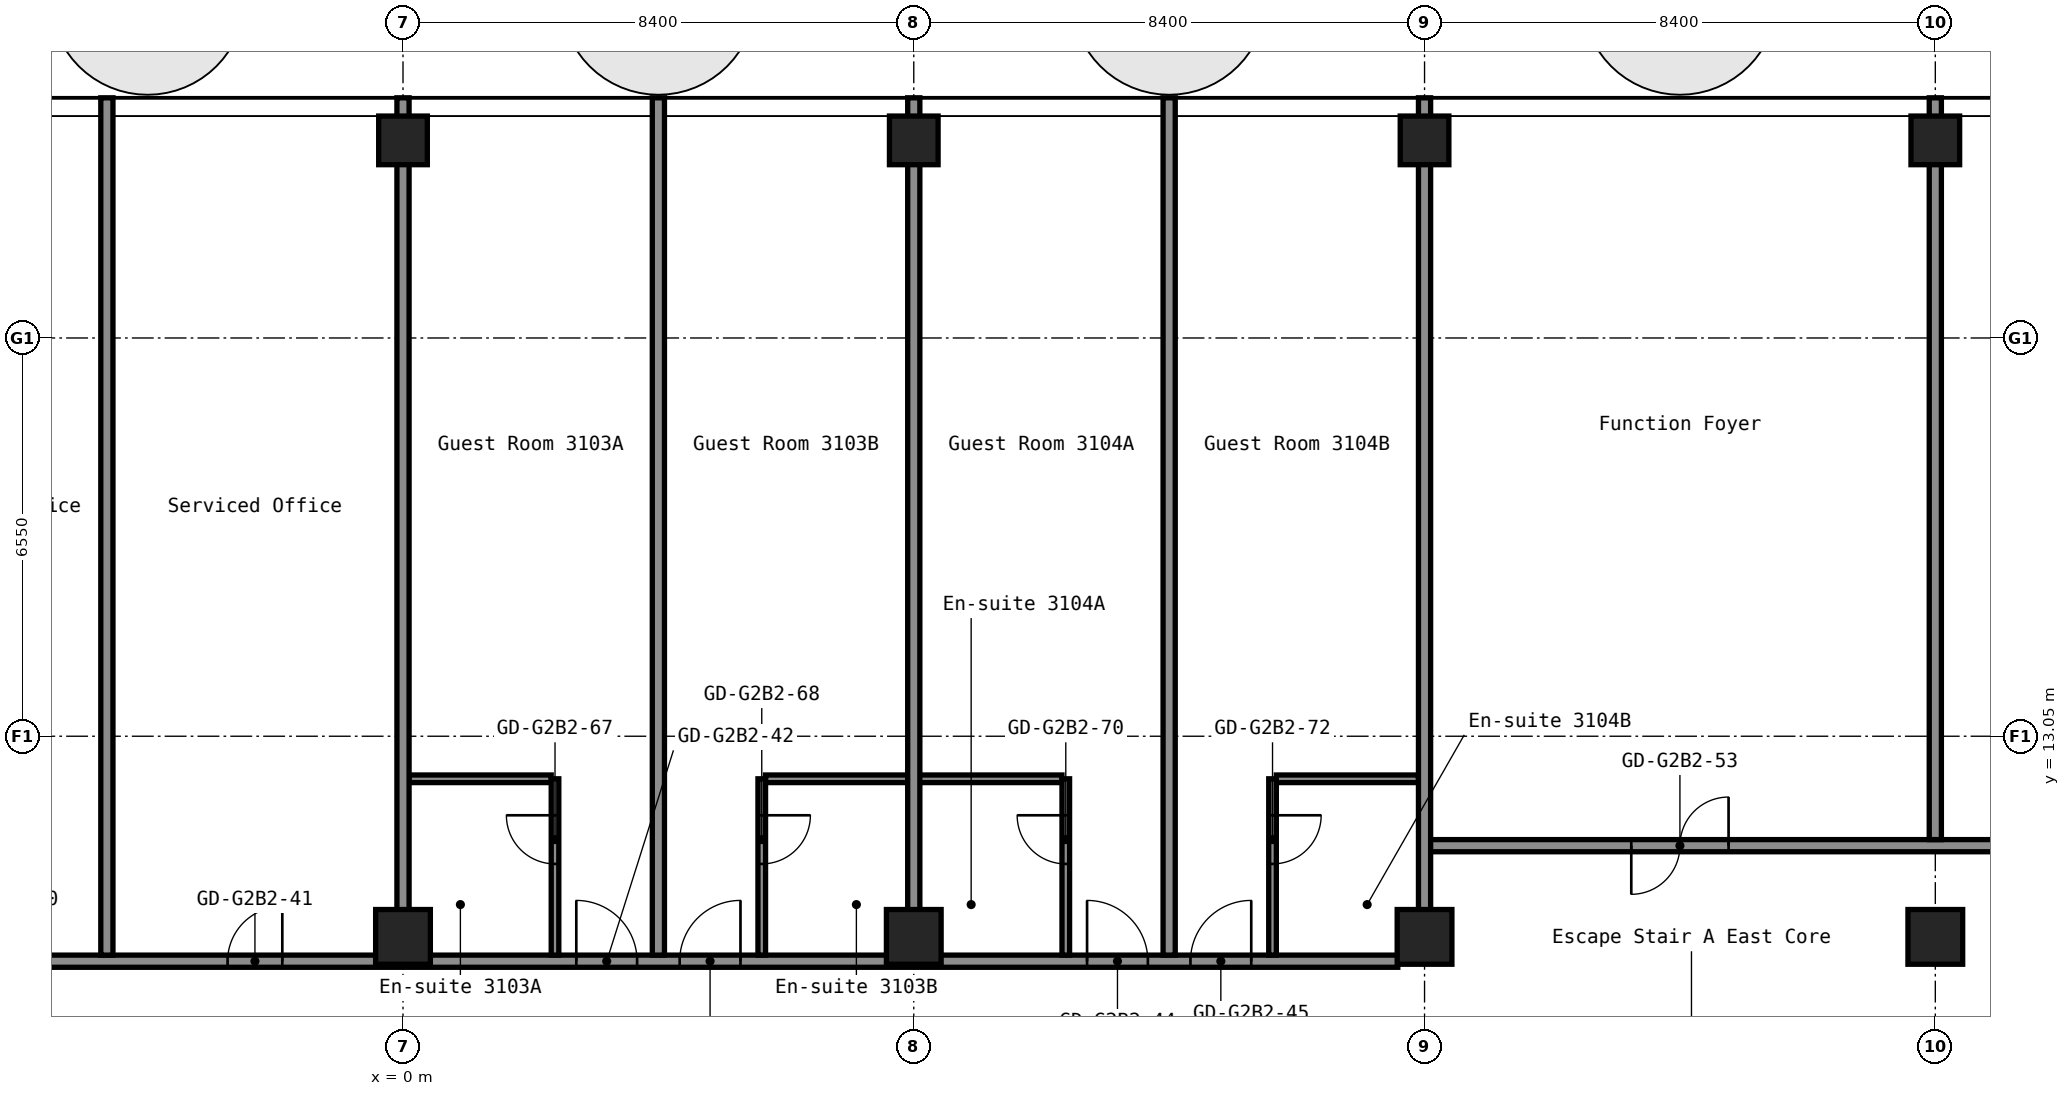
"""IFC4 building model, lengths in metres.
Left out: names, types, materials, properties, quantities, classifications, styles, units other than length and angle.
Written with IfcOpenShell. Run it as: python <this file> out.ifc"""

import sys

from ifc_helpers import new_model, si_unit, direction, frame, frame_2d, origin, origin_2d, place, context, subcontext, project, spatial, rectangle, hollow_rectangle, extrude, element, fill, save


model = new_model("IFC4")
c1 = context("Model", 3, precision=1e-05, world=origin(), true_north=direction((0.0, 1.0)))
c2 = subcontext(c1, "Body", "Model", "MODEL_VIEW")
j1 = project(units=[si_unit("LENGTHUNIT", "METRE"), si_unit("PLANEANGLEUNIT", "RADIAN")], contexts=[c1])
p1 = place(None, origin())
s1 = spatial("IfcSite", under=j1, at=p1, CompositionType="ELEMENT")
p2 = place(p1, origin())
s2 = spatial("IfcBuilding", under=s1, at=p2, CompositionType="ELEMENT")
p3 = place(p2, frame((0.0, 0.0, 110.6)))
s3 = spatial("IfcBuildingStorey", under=s2, at=p3, CompositionType="ELEMENT", Elevation=110.6)
p4 = place(p3, frame((0.0, 9.75, 0.0), z_axis=(0.0, 0.0, 1.0), x_axis=(1.0, 0.0, 0.0)))
e1 = element("IfcColumn", 1, at=p4, inside=s3, PredefinedType="COLUMN", context=c2, shape_type="SweptSolid", body=[
    extrude(hollow_rectangle(XDim=0.9, YDim=0.9, WallThickness=0.036, at=origin_2d()), origin(), (0.0, 0.0, 1.0), 2.8),
])
p5 = place(p3, frame((0.0, 22.85, 0.0), z_axis=(0.0, 0.0, 1.0), x_axis=(1.0, 0.0, 0.0)))
e2 = element("IfcColumn", 2, at=p5, inside=s3, PredefinedType="COLUMN", context=c2, shape_type="SweptSolid", body=[
    extrude(hollow_rectangle(XDim=0.8, YDim=0.8, WallThickness=0.032, at=origin_2d()), origin(), (0.0, 0.0, 1.0), 2.8),
])
p6 = place(p3, frame((8.4, 9.75, 0.0), z_axis=(0.0, 0.0, 1.0), x_axis=(1.0, 0.0, 0.0)))
e3 = element("IfcColumn", 3, at=p6, inside=s3, PredefinedType="COLUMN", context=c2, shape_type="SweptSolid", body=[
    extrude(hollow_rectangle(XDim=0.9, YDim=0.9, WallThickness=0.036, at=origin_2d()), origin(), (0.0, 0.0, 1.0), 2.8),
])
p7 = place(p3, frame((8.4, 22.85, 0.0), z_axis=(0.0, 0.0, 1.0), x_axis=(1.0, 0.0, 0.0)))
e4 = element("IfcColumn", 4, at=p7, inside=s3, PredefinedType="COLUMN", context=c2, shape_type="SweptSolid", body=[
    extrude(hollow_rectangle(XDim=0.8, YDim=0.8, WallThickness=0.032, at=origin_2d()), origin(), (0.0, 0.0, 1.0), 2.8),
])
p8 = place(p3, frame((16.8, 9.75, 0.0), z_axis=(0.0, 0.0, 1.0), x_axis=(1.0, 0.0, 0.0)))
e5 = element("IfcColumn", 5, at=p8, inside=s3, PredefinedType="COLUMN", context=c2, shape_type="SweptSolid", body=[
    extrude(hollow_rectangle(XDim=0.9, YDim=0.9, WallThickness=0.036, at=origin_2d()), origin(), (0.0, 0.0, 1.0), 2.8),
])
p9 = place(p3, frame((16.8, 22.85, 0.0), z_axis=(0.0, 0.0, 1.0), x_axis=(1.0, 0.0, 0.0)))
e6 = element("IfcColumn", 6, at=p9, inside=s3, PredefinedType="COLUMN", context=c2, shape_type="SweptSolid", body=[
    extrude(hollow_rectangle(XDim=0.8, YDim=0.8, WallThickness=0.032, at=origin_2d()), origin(), (0.0, 0.0, 1.0), 2.8),
])
p10 = place(p3, frame((25.2, 9.75, 0.0), z_axis=(0.0, 0.0, 1.0), x_axis=(1.0, 0.0, 0.0)))
e7 = element("IfcColumn", 7, at=p10, inside=s3, PredefinedType="COLUMN", context=c2, shape_type="SweptSolid", body=[
    extrude(hollow_rectangle(XDim=0.9, YDim=0.9, WallThickness=0.036, at=origin_2d()), origin(), (0.0, 0.0, 1.0), 2.8),
])
p11 = place(p3, frame((25.2, 22.85, 0.0), z_axis=(0.0, 0.0, 1.0), x_axis=(1.0, 0.0, 0.0)))
e8 = element("IfcColumn", 8, at=p11, inside=s3, PredefinedType="COLUMN", context=c2, shape_type="SweptSolid", body=[
    extrude(hollow_rectangle(XDim=0.8, YDim=0.8, WallThickness=0.032, at=origin_2d()), origin(), (0.0, 0.0, 1.0), 2.8),
])
p12 = place(p3, frame((-16.36, 9.35, 0.0), z_axis=(0.0, 0.0, 1.0), x_axis=(1.0, 0.0, 0.0)))
e9 = element("IfcWall", 9, at=p12, inside=s3, PredefinedType="PARTITIONING", context=c2, shape_type="SweptSolid", body=[
    extrude(rectangle(XDim=32.72, YDim=0.2, at=frame_2d((16.36, 0.0))), origin(), (0.0, 0.0, 1.0), 2.8),
])
p13 = place(p12, frame((1.545, 0.0, 0.0)))
e10 = element("IfcOpeningElement", 10, at=p13, cuts=e9, PredefinedType="OPENING", context=c2, shape_type="SweptSolid", body=[
    extrude(rectangle(XDim=0.9, YDim=2.1, at=frame_2d((0.45, 1.05))), frame((0.0, 0.11, 0.0), z_axis=(0.0, -1.0, 0.0), x_axis=(1.0, 0.0, 0.0)), (0.0, 0.0, 1.0), 0.22),
])
p14 = place(p12, frame((5.745, 0.0, 0.0)))
e11 = element("IfcOpeningElement", 11, at=p14, cuts=e9, PredefinedType="OPENING", context=c2, shape_type="SweptSolid", body=[
    extrude(rectangle(XDim=0.9, YDim=2.1, at=frame_2d((0.45, 1.05))), frame((0.0, 0.11, 0.0), z_axis=(0.0, -1.0, 0.0), x_axis=(1.0, 0.0, 0.0)), (0.0, 0.0, 1.0), 0.22),
])
p15 = place(p12, frame((9.275, 0.0, 0.0)))
e12 = element("IfcOpeningElement", 12, at=p15, cuts=e9, PredefinedType="OPENING", context=c2, shape_type="SweptSolid", body=[
    extrude(rectangle(XDim=0.9, YDim=2.1, at=frame_2d((0.45, 1.05))), frame((0.0, 0.11, 0.0), z_axis=(0.0, -1.0, 0.0), x_axis=(1.0, 0.0, 0.0)), (0.0, 0.0, 1.0), 0.22),
])
p16 = place(p12, frame((13.475, 0.0, 0.0)))
e13 = element("IfcOpeningElement", 13, at=p16, cuts=e9, PredefinedType="OPENING", context=c2, shape_type="SweptSolid", body=[
    extrude(rectangle(XDim=0.9, YDim=2.1, at=frame_2d((0.45, 1.05))), frame((0.0, 0.11, 0.0), z_axis=(0.0, -1.0, 0.0), x_axis=(1.0, 0.0, 0.0)), (0.0, 0.0, 1.0), 0.22),
])
p17 = place(p12, frame((19.21, 0.0, 0.0)))
e14 = element("IfcOpeningElement", 14, at=p17, cuts=e9, PredefinedType="OPENING", context=c2, shape_type="SweptSolid", body=[
    extrude(rectangle(XDim=1.0, YDim=2.1, at=frame_2d((0.5, 1.05))), frame((0.0, 0.11, 0.0), z_axis=(0.0, -1.0, 0.0), x_axis=(1.0, 0.0, 0.0)), (0.0, 0.0, 1.0), 0.22),
])
p18 = place(p12, frame((20.91, 0.0, 0.0)))
e15 = element("IfcOpeningElement", 15, at=p18, cuts=e9, PredefinedType="OPENING", context=c2, shape_type="SweptSolid", body=[
    extrude(rectangle(XDim=1.0, YDim=2.1, at=frame_2d((0.5, 1.05))), frame((0.0, 0.11, 0.0), z_axis=(0.0, -1.0, 0.0), x_axis=(1.0, 0.0, 0.0)), (0.0, 0.0, 1.0), 0.22),
])
p19 = place(p12, frame((27.61, 0.0, 0.0)))
e16 = element("IfcOpeningElement", 16, at=p19, cuts=e9, PredefinedType="OPENING", context=c2, shape_type="SweptSolid", body=[
    extrude(rectangle(XDim=1.0, YDim=2.1, at=frame_2d((0.5, 1.05))), frame((0.0, 0.11, 0.0), z_axis=(0.0, -1.0, 0.0), x_axis=(1.0, 0.0, 0.0)), (0.0, 0.0, 1.0), 0.22),
])
p20 = place(p12, frame((29.31, 0.0, 0.0)))
e17 = element("IfcOpeningElement", 17, at=p20, cuts=e9, PredefinedType="OPENING", context=c2, shape_type="SweptSolid", body=[
    extrude(rectangle(XDim=1.0, YDim=2.1, at=frame_2d((0.5, 1.05))), frame((0.0, 0.11, 0.0), z_axis=(0.0, -1.0, 0.0), x_axis=(1.0, 0.0, 0.0)), (0.0, 0.0, 1.0), 0.22),
])
p21 = place(p3, frame((16.8, 11.25, 0.0), z_axis=(0.0, 0.0, 1.0), x_axis=(1.0, 0.0, 0.0)))
e18 = element("IfcWall", 18, at=p21, inside=s3, PredefinedType="PARTITIONING", context=c2, shape_type="SweptSolid", body=[
    extrude(rectangle(XDim=29.7, YDim=0.2, at=frame_2d((14.85, 0.0))), origin(), (0.0, 0.0, 1.0), 2.8),
])
p22 = place(p21, frame((3.4, 0.0, 0.0)))
e19 = element("IfcOpeningElement", 19, at=p22, cuts=e18, PredefinedType="OPENING", context=c2, shape_type="SweptSolid", body=[
    extrude(rectangle(XDim=1.6, YDim=2.1, at=frame_2d((0.8, 1.05))), frame((0.0, 0.11, 0.0), z_axis=(0.0, -1.0, 0.0), x_axis=(1.0, 0.0, 0.0)), (0.0, 0.0, 1.0), 0.22),
])
p23 = place(p21, frame((11.8, 0.0, 0.0)))
e20 = element("IfcOpeningElement", 20, at=p23, cuts=e18, PredefinedType="OPENING", context=c2, shape_type="SweptSolid", body=[
    extrude(rectangle(XDim=1.6, YDim=2.1, at=frame_2d((0.8, 1.05))), frame((0.0, 0.11, 0.0), z_axis=(0.0, -1.0, 0.0), x_axis=(1.0, 0.0, 0.0)), (0.0, 0.0, 1.0), 0.22),
])
p24 = place(p21, frame((20.2, 0.0, 0.0)))
e21 = element("IfcOpeningElement", 21, at=p24, cuts=e18, PredefinedType="OPENING", context=c2, shape_type="SweptSolid", body=[
    extrude(rectangle(XDim=1.6, YDim=2.1, at=frame_2d((0.8, 1.05))), frame((0.0, 0.11, 0.0), z_axis=(0.0, -1.0, 0.0), x_axis=(1.0, 0.0, 0.0)), (0.0, 0.0, 1.0), 0.22),
])
p25 = place(p21, frame((26.85, 0.0, 0.0)))
e22 = element("IfcOpeningElement", 22, at=p25, cuts=e18, PredefinedType="OPENING", context=c2, shape_type="SweptSolid", body=[
    extrude(rectangle(XDim=0.9, YDim=2.1, at=frame_2d((0.45, 1.05))), frame((0.0, 0.11, 0.0), z_axis=(0.0, -1.0, 0.0), x_axis=(1.0, 0.0, 0.0)), (0.0, 0.0, 1.0), 0.22),
])
p26 = place(p3, frame((0.1, 12.35, 0.0), z_axis=(0.0, 0.0, 1.0), x_axis=(1.0, 0.0, 0.0)))
e23 = element("IfcWall", 23, at=p26, inside=s3, PredefinedType="PARTITIONING", context=c2, shape_type="SweptSolid", body=[
    extrude(rectangle(XDim=2.337, YDim=0.125, at=frame_2d((1.169, 0.0))), origin(), (0.0, 0.0, 1.0), 2.8),
])
p27 = place(p3, frame((5.962, 12.35, 0.0), z_axis=(0.0, 0.0, 1.0), x_axis=(1.0, 0.0, 0.0)))
e24 = element("IfcWall", 24, at=p27, inside=s3, PredefinedType="PARTITIONING", context=c2, shape_type="SweptSolid", body=[
    extrude(rectangle(XDim=4.875, YDim=0.125, at=frame_2d((2.438, 0.0))), origin(), (0.0, 0.0, 1.0), 2.8),
])
p28 = place(p3, frame((14.363, 12.35, 0.0), z_axis=(0.0, 0.0, 1.0), x_axis=(1.0, 0.0, 0.0)))
e25 = element("IfcWall", 25, at=p28, inside=s3, PredefinedType="PARTITIONING", context=c2, shape_type="SweptSolid", body=[
    extrude(rectangle(XDim=2.337, YDim=0.125, at=frame_2d((1.169, 0.0))), origin(), (0.0, 0.0, 1.0), 2.8),
])
p29 = place(p3, frame((-4.87, 9.45, 0.0), z_axis=(0.0, 0.0, 1.0), x_axis=(0.0, 1.0, 0.0)))
e26 = element("IfcWall", 26, at=p29, inside=s3, PredefinedType="PARTITIONING", context=c2, shape_type="SweptSolid", body=[
    extrude(rectangle(XDim=14.1, YDim=0.2, at=frame_2d((7.05, 0.0))), origin(), (0.0, 0.0, 1.0), 2.8),
])
p30 = place(p3, frame((0.0, 10.19, 0.0), z_axis=(0.0, 0.0, 1.0), x_axis=(0.0, 1.0, 0.0)))
e27 = element("IfcWall", 27, at=p30, inside=s3, PredefinedType="PARTITIONING", context=c2, shape_type="SweptSolid", body=[
    extrude(rectangle(XDim=13.36, YDim=0.2, at=frame_2d((6.68, 0.0))), origin(), (0.0, 0.0, 1.0), 2.8),
])
p31 = place(p3, frame((2.5, 9.45, 0.0), z_axis=(0.0, 0.0, 1.0), x_axis=(0.0, 1.0, 0.0)))
e28 = element("IfcWall", 28, at=p31, inside=s3, PredefinedType="PARTITIONING", context=c2, shape_type="SweptSolid", body=[
    extrude(rectangle(XDim=2.9, YDim=0.125, at=frame_2d((1.45, 0.0))), origin(), (0.0, 0.0, 1.0), 2.8),
])
p32 = place(p31, frame((1.5, 0.0, 0.0)))
e29 = element("IfcOpeningElement", 29, at=p32, cuts=e28, PredefinedType="OPENING", context=c2, shape_type="SweptSolid", body=[
    extrude(rectangle(XDim=0.8, YDim=2.1, at=frame_2d((0.4, 1.05))), frame((0.0, 0.073, 0.0), z_axis=(0.0, -1.0, 0.0), x_axis=(1.0, 0.0, 0.0)), (0.0, 0.0, 1.0), 0.145),
])
p33 = place(p3, frame((4.2, 9.45, 0.0), z_axis=(0.0, 0.0, 1.0), x_axis=(0.0, 1.0, 0.0)))
e30 = element("IfcWall", 30, at=p33, inside=s3, PredefinedType="PARTITIONING", context=c2, shape_type="SweptSolid", body=[
    extrude(rectangle(XDim=14.1, YDim=0.2, at=frame_2d((7.05, 0.0))), origin(), (0.0, 0.0, 1.0), 2.8),
])
p34 = place(p3, frame((5.9, 9.45, 0.0), z_axis=(0.0, 0.0, 1.0), x_axis=(0.0, 1.0, 0.0)))
e31 = element("IfcWall", 31, at=p34, inside=s3, PredefinedType="PARTITIONING", context=c2, shape_type="SweptSolid", body=[
    extrude(rectangle(XDim=2.9, YDim=0.125, at=frame_2d((1.45, 0.0))), origin(), (0.0, 0.0, 1.0), 2.8),
])
p35 = place(p34, frame((1.5, 0.0, 0.0)))
e32 = element("IfcOpeningElement", 32, at=p35, cuts=e31, PredefinedType="OPENING", context=c2, shape_type="SweptSolid", body=[
    extrude(rectangle(XDim=0.8, YDim=2.1, at=frame_2d((0.4, 1.05))), frame((0.0, 0.073, 0.0), z_axis=(0.0, -1.0, 0.0), x_axis=(1.0, 0.0, 0.0)), (0.0, 0.0, 1.0), 0.145),
])
p36 = place(p3, frame((8.4, 10.19, 0.0), z_axis=(0.0, 0.0, 1.0), x_axis=(0.0, 1.0, 0.0)))
e33 = element("IfcWall", 33, at=p36, inside=s3, PredefinedType="PARTITIONING", context=c2, shape_type="SweptSolid", body=[
    extrude(rectangle(XDim=13.36, YDim=0.2, at=frame_2d((6.68, 0.0))), origin(), (0.0, 0.0, 1.0), 2.8),
])
p37 = place(p3, frame((10.9, 9.45, 0.0), z_axis=(0.0, 0.0, 1.0), x_axis=(0.0, 1.0, 0.0)))
e34 = element("IfcWall", 34, at=p37, inside=s3, PredefinedType="PARTITIONING", context=c2, shape_type="SweptSolid", body=[
    extrude(rectangle(XDim=2.9, YDim=0.125, at=frame_2d((1.45, 0.0))), origin(), (0.0, 0.0, 1.0), 2.8),
])
p38 = place(p37, frame((1.5, 0.0, 0.0)))
e35 = element("IfcOpeningElement", 35, at=p38, cuts=e34, PredefinedType="OPENING", context=c2, shape_type="SweptSolid", body=[
    extrude(rectangle(XDim=0.8, YDim=2.1, at=frame_2d((0.4, 1.05))), frame((0.0, 0.073, 0.0), z_axis=(0.0, -1.0, 0.0), x_axis=(1.0, 0.0, 0.0)), (0.0, 0.0, 1.0), 0.145),
])
p39 = place(p3, frame((12.6, 9.45, 0.0), z_axis=(0.0, 0.0, 1.0), x_axis=(0.0, 1.0, 0.0)))
e36 = element("IfcWall", 36, at=p39, inside=s3, PredefinedType="PARTITIONING", context=c2, shape_type="SweptSolid", body=[
    extrude(rectangle(XDim=14.1, YDim=0.2, at=frame_2d((7.05, 0.0))), origin(), (0.0, 0.0, 1.0), 2.8),
])
p40 = place(p3, frame((14.3, 9.45, 0.0), z_axis=(0.0, 0.0, 1.0), x_axis=(0.0, 1.0, 0.0)))
e37 = element("IfcWall", 37, at=p40, inside=s3, PredefinedType="PARTITIONING", context=c2, shape_type="SweptSolid", body=[
    extrude(rectangle(XDim=2.9, YDim=0.125, at=frame_2d((1.45, 0.0))), origin(), (0.0, 0.0, 1.0), 2.8),
])
p41 = place(p40, frame((1.5, 0.0, 0.0)))
e38 = element("IfcOpeningElement", 38, at=p41, cuts=e37, PredefinedType="OPENING", context=c2, shape_type="SweptSolid", body=[
    extrude(rectangle(XDim=0.8, YDim=2.1, at=frame_2d((0.4, 1.05))), frame((0.0, 0.073, 0.0), z_axis=(0.0, -1.0, 0.0), x_axis=(1.0, 0.0, 0.0)), (0.0, 0.0, 1.0), 0.145),
])
p42 = place(p3, frame((16.8, 10.19, 0.0), z_axis=(0.0, 0.0, 1.0), x_axis=(0.0, 1.0, 0.0)))
e39 = element("IfcWall", 39, at=p42, inside=s3, PredefinedType="PARTITIONING", context=c2, shape_type="SweptSolid", body=[
    extrude(rectangle(XDim=13.36, YDim=0.2, at=frame_2d((6.68, 0.0))), origin(), (0.0, 0.0, 1.0), 2.8),
])
p43 = place(p3, frame((25.2, 11.35, 0.0), z_axis=(0.0, 0.0, 1.0), x_axis=(0.0, 1.0, 0.0)))
e40 = element("IfcWall", 40, at=p43, inside=s3, PredefinedType="PARTITIONING", context=c2, shape_type="SweptSolid", body=[
    extrude(rectangle(XDim=12.2, YDim=0.2, at=frame_2d((6.1, 0.0))), origin(), (0.0, 0.0, 1.0), 2.8),
])
p44 = place(p16, origin())
e41 = element("IfcDoor", 41, at=p44, inside=s3, OperationType="SINGLE_SWING_LEFT", PredefinedType="DOOR", context=c2, shape_type="SweptSolid", body=[
    extrude(rectangle(XDim=0.9, YDim=2.1, at=frame_2d((0.45, 1.05))), frame((0.0, 0.025, 0.0), z_axis=(0.0, -1.0, 0.0), x_axis=(1.0, 0.0, 0.0)), (0.0, 0.0, 1.0), 0.05),
])
fill(e13, e41)
p45 = place(p17, origin())
e42 = element("IfcDoor", 42, at=p45, inside=s3, OperationType="SINGLE_SWING_RIGHT", PredefinedType="DOOR", context=c2, shape_type="SweptSolid", body=[
    extrude(rectangle(XDim=1.0, YDim=2.1, at=frame_2d((0.5, 1.05))), frame((0.0, 0.025, 0.0), z_axis=(0.0, -1.0, 0.0), x_axis=(1.0, 0.0, 0.0)), (0.0, 0.0, 1.0), 0.05),
])
fill(e14, e42)
p46 = place(p18, origin())
e43 = element("IfcDoor", 43, at=p46, inside=s3, OperationType="SINGLE_SWING_LEFT", PredefinedType="DOOR", context=c2, shape_type="SweptSolid", body=[
    extrude(rectangle(XDim=1.0, YDim=2.1, at=frame_2d((0.5, 1.05))), frame((0.0, 0.025, 0.0), z_axis=(0.0, -1.0, 0.0), x_axis=(1.0, 0.0, 0.0)), (0.0, 0.0, 1.0), 0.05),
])
fill(e15, e43)
p47 = place(p19, origin())
e44 = element("IfcDoor", 44, at=p47, inside=s3, OperationType="SINGLE_SWING_RIGHT", PredefinedType="DOOR", context=c2, shape_type="SweptSolid", body=[
    extrude(rectangle(XDim=1.0, YDim=2.1, at=frame_2d((0.5, 1.05))), frame((0.0, 0.025, 0.0), z_axis=(0.0, -1.0, 0.0), x_axis=(1.0, 0.0, 0.0)), (0.0, 0.0, 1.0), 0.05),
])
fill(e16, e44)
p48 = place(p20, origin())
e45 = element("IfcDoor", 45, at=p48, inside=s3, OperationType="SINGLE_SWING_LEFT", PredefinedType="DOOR", context=c2, shape_type="SweptSolid", body=[
    extrude(rectangle(XDim=1.0, YDim=2.1, at=frame_2d((0.5, 1.05))), frame((0.0, 0.025, 0.0), z_axis=(0.0, -1.0, 0.0), x_axis=(1.0, 0.0, 0.0)), (0.0, 0.0, 1.0), 0.05),
])
fill(e17, e45)
p49 = place(p22, origin())
e46 = element("IfcDoor", 46, at=p49, inside=s3, OperationType="DOUBLE_DOOR_SINGLE_SWING", PredefinedType="DOOR", context=c2, shape_type="SweptSolid", body=[
    extrude(rectangle(XDim=1.6, YDim=2.1, at=frame_2d((0.8, 1.05))), frame((0.0, 0.025, 0.0), z_axis=(0.0, -1.0, 0.0), x_axis=(1.0, 0.0, 0.0)), (0.0, 0.0, 1.0), 0.05),
])
fill(e19, e46)
p50 = place(p32, origin())
e47 = element("IfcDoor", 47, at=p50, inside=s3, OperationType="SINGLE_SWING_LEFT", PredefinedType="DOOR", context=c2, shape_type="SweptSolid", body=[
    extrude(rectangle(XDim=0.8, YDim=2.1, at=frame_2d((0.4, 1.05))), frame((0.0, 0.025, 0.0), z_axis=(0.0, -1.0, 0.0), x_axis=(1.0, 0.0, 0.0)), (0.0, 0.0, 1.0), 0.05),
])
fill(e29, e47)
p51 = place(p35, origin())
e48 = element("IfcDoor", 48, at=p51, inside=s3, OperationType="SINGLE_SWING_RIGHT", PredefinedType="DOOR", context=c2, shape_type="SweptSolid", body=[
    extrude(rectangle(XDim=0.8, YDim=2.1, at=frame_2d((0.4, 1.05))), frame((0.0, 0.025, 0.0), z_axis=(0.0, -1.0, 0.0), x_axis=(1.0, 0.0, 0.0)), (0.0, 0.0, 1.0), 0.05),
])
fill(e32, e48)
p52 = place(p38, origin())
e49 = element("IfcDoor", 49, at=p52, inside=s3, OperationType="SINGLE_SWING_LEFT", PredefinedType="DOOR", context=c2, shape_type="SweptSolid", body=[
    extrude(rectangle(XDim=0.8, YDim=2.1, at=frame_2d((0.4, 1.05))), frame((0.0, 0.025, 0.0), z_axis=(0.0, -1.0, 0.0), x_axis=(1.0, 0.0, 0.0)), (0.0, 0.0, 1.0), 0.05),
])
fill(e35, e49)
p53 = place(p41, origin())
e50 = element("IfcDoor", 50, at=p53, inside=s3, OperationType="SINGLE_SWING_RIGHT", PredefinedType="DOOR", context=c2, shape_type="SweptSolid", body=[
    extrude(rectangle(XDim=0.8, YDim=2.1, at=frame_2d((0.4, 1.05))), frame((0.0, 0.025, 0.0), z_axis=(0.0, -1.0, 0.0), x_axis=(1.0, 0.0, 0.0)), (0.0, 0.0, 1.0), 0.05),
])
fill(e38, e50)
save(model, sys.argv[1])
